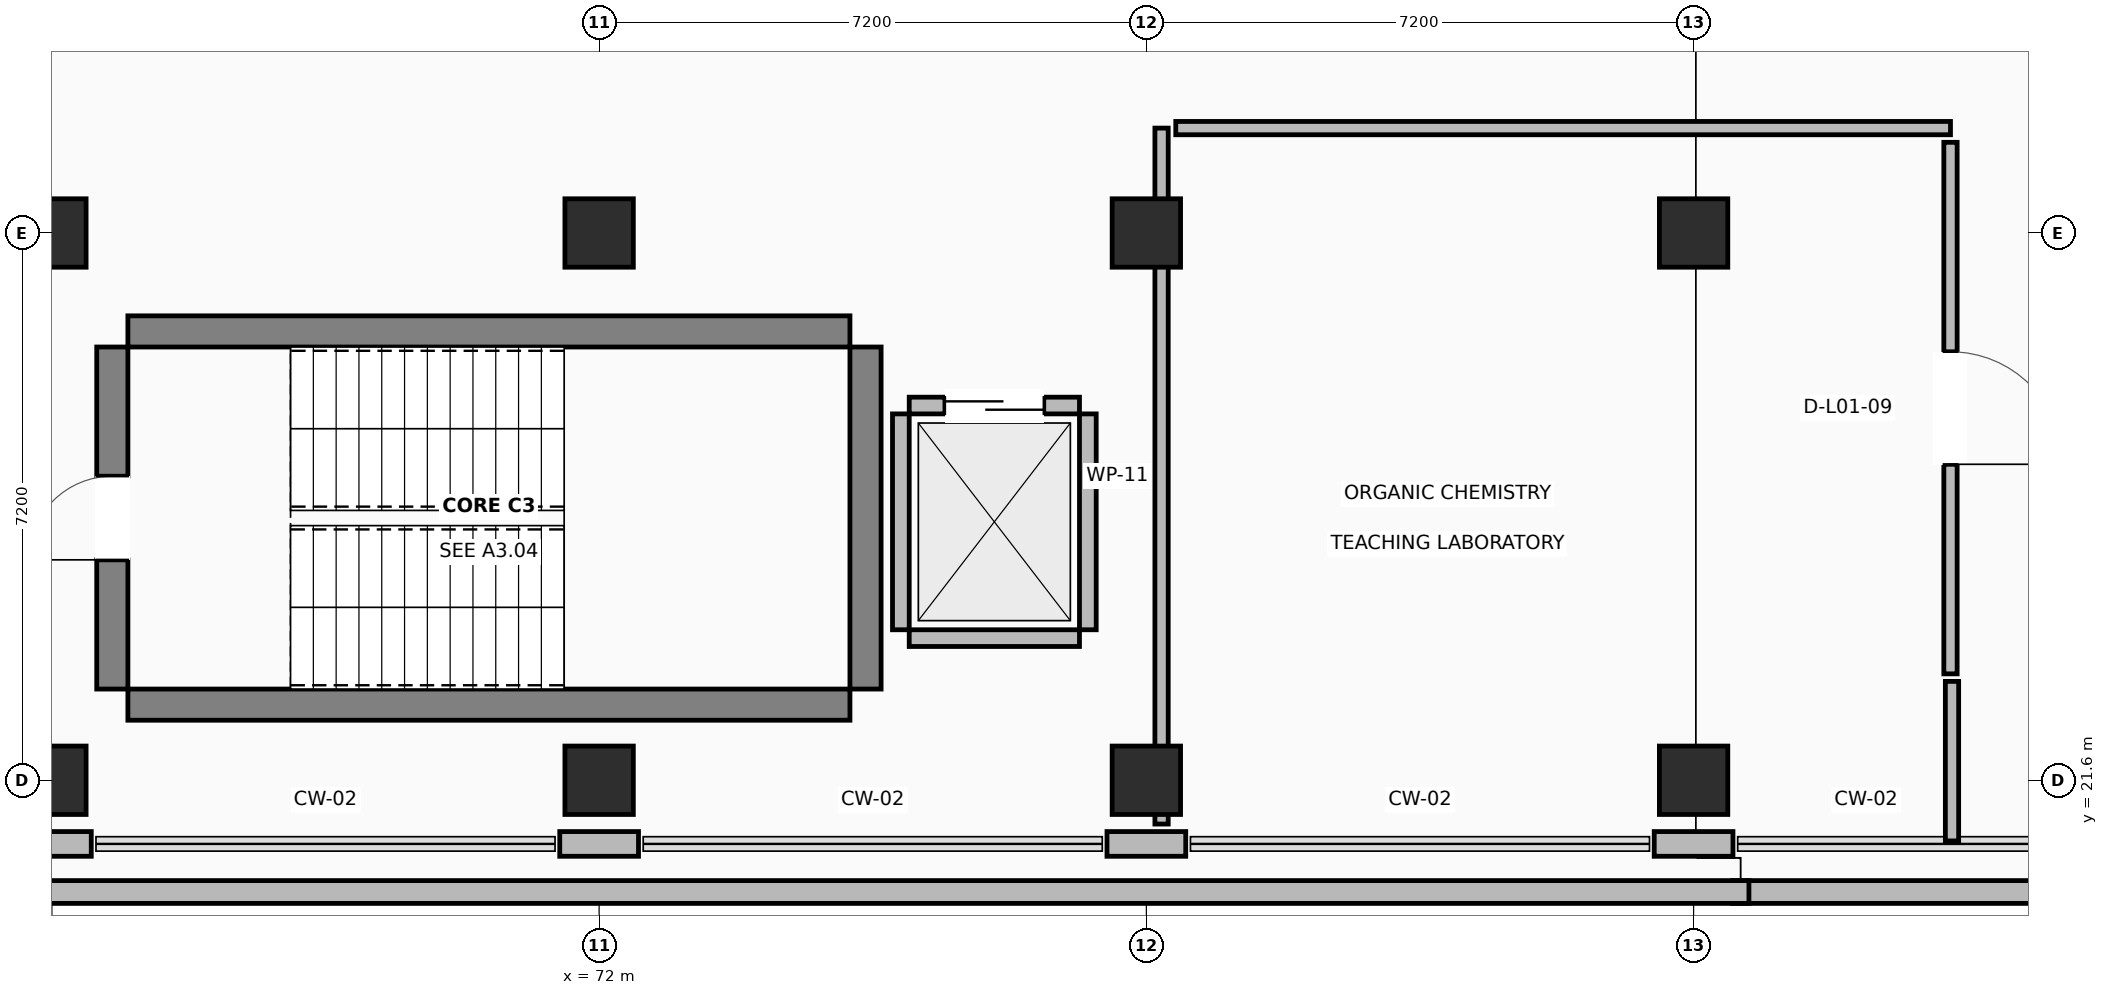
"""IFC4 building model, lengths in metres.
Left out: names, types, materials, properties, quantities, classifications, styles, units other than length and angle.
Written with IfcOpenShell. Run it as: python <this file> out.ifc"""

import sys

from ifc_helpers import new_model, si_unit, direction, frame, frame_2d, origin, origin_2d, place, context, subcontext, project, spatial, rectangle, extrude, element, fill, save


model = new_model("IFC4")
c1 = context("Model", 3, precision=1e-05, world=origin(), true_north=direction((0.0, 1.0)))
c2 = subcontext(c1, "Body", "Model", "MODEL_VIEW")
j1 = project(units=[si_unit("LENGTHUNIT", "METRE"), si_unit("PLANEANGLEUNIT", "RADIAN")], contexts=[c1])
p1 = place(None, origin())
s1 = spatial("IfcSite", under=j1, at=p1, CompositionType="ELEMENT")
p2 = place(p1, origin())
s2 = spatial("IfcBuilding", under=s1, at=p2, CompositionType="ELEMENT")
p3 = place(p2, frame((0.0, 0.0, 4.5)))
s3 = spatial("IfcBuildingStorey", under=s2, at=p3, CompositionType="ELEMENT", Elevation=4.5)
for number, where, z_axis, x_axis in (
    (1, (64.8, 21.6, 0.0), (0.0, 0.0, 1.0), (1.0, 0.0, 0.0)),
    (2, (64.8, 28.8, 0.0), (0.0, 0.0, 1.0), (1.0, 0.0, 0.0)),
    (3, (72.0, 21.6, 0.0), (0.0, 0.0, 1.0), (1.0, 0.0, 0.0)),
    (4, (72.0, 28.8, 0.0), (0.0, 0.0, 1.0), (1.0, 0.0, 0.0)),
    (5, (79.2, 21.6, 0.0), (0.0, 0.0, 1.0), (1.0, 0.0, 0.0)),
    (6, (79.2, 28.8, 0.0), (0.0, 0.0, 1.0), (1.0, 0.0, 0.0)),
    (7, (86.4, 21.6, 0.0), (0.0, 0.0, 1.0), (1.0, 0.0, 0.0)),
    (8, (86.4, 28.8, 0.0), (0.0, 0.0, 1.0), (1.0, 0.0, 0.0)),
):
    element("IfcColumn", number, at=place(p3, frame(where, z_axis=z_axis, x_axis=x_axis)), inside=s3, PredefinedType="COLUMN", context=c2, shape_type="SweptSolid", body=[
        extrude(rectangle(XDim=0.9, YDim=0.9, at=origin_2d()), origin(), (0.0, 0.0, 1.0), 4.22),
    ])
for number, where, z_axis, x_axis in (
    (9, (65.8, 22.595, 0.0), (0.0, 0.0, 1.0), (1.0, 0.0, 0.0)),
    (10, (65.8, 27.505, 0.0), (0.0, 0.0, 1.0), (1.0, 0.0, 0.0)),
):
    element("IfcWall", number, at=place(p3, frame(where, z_axis=z_axis, x_axis=x_axis)), inside=s3, PredefinedType="SHEAR", context=c2, shape_type="SweptSolid", body=[
        extrude(rectangle(XDim=9.5, YDim=0.41, at=frame_2d((4.75, 0.0))), origin(), (0.0, 0.0, 1.0), 4.22),
    ])
p4 = place(p3, frame((65.595, 22.8, 0.0), z_axis=(0.0, 0.0, 1.0), x_axis=(0.0, 1.0, 0.0)))
e11 = element("IfcWall", 11, at=p4, inside=s3, PredefinedType="SHEAR", context=c2, shape_type="SweptSolid", body=[
    extrude(rectangle(XDim=4.5, YDim=0.41, at=frame_2d((2.25, 0.0))), origin(), (0.0, 0.0, 1.0), 4.22),
])
p5 = place(p4, frame((1.7, 0.0, 0.0)))
e12 = element("IfcOpeningElement", 12, at=p5, cuts=e11, PredefinedType="OPENING", context=c2, shape_type="SweptSolid", body=[
    extrude(rectangle(XDim=1.1, YDim=2.15, at=frame_2d((0.55, 1.075))), frame((0.0, 0.215, 0.0), z_axis=(0.0, -1.0, 0.0), x_axis=(1.0, 0.0, 0.0)), (0.0, 0.0, 1.0), 0.43),
])
p6 = place(p3, frame((75.505, 22.8, 0.0), z_axis=(0.0, 0.0, 1.0), x_axis=(0.0, 1.0, 0.0)))
e13 = element("IfcWall", 13, at=p6, inside=s3, PredefinedType="SHEAR", context=c2, shape_type="SweptSolid", body=[
    extrude(rectangle(XDim=4.5, YDim=0.41, at=frame_2d((2.25, 0.0))), origin(), (0.0, 0.0, 1.0), 4.22),
])
for number, where, z_axis, x_axis in (
    (14, (64.282, 20.762, 0.0), (0.0, 0.0, 1.0), (1.0, 0.0, 0.0)),
    (15, (71.482, 20.762, 0.0), (0.0, 0.0, 1.0), (1.0, 0.0, 0.0)),
    (16, (78.682, 20.762, 0.0), (0.0, 0.0, 1.0), (1.0, 0.0, 0.0)),
):
    element("IfcWall", number, at=place(p3, frame(where, z_axis=z_axis, x_axis=x_axis)), inside=s3, PredefinedType="STANDARD", context=c2, shape_type="SweptSolid", body=[
        extrude(rectangle(XDim=1.036, YDim=0.325, at=frame_2d((0.518, 0.0))), origin(), (0.0, 0.0, 1.0), 3.26),
    ])
p7 = place(p3, frame((85.882, 20.762, 0.0), z_axis=(0.0, 0.0, 1.0), x_axis=(1.0, 0.0, 0.0)))
e17 = element("IfcWall", 17, at=p7, inside=s3, PredefinedType="STANDARD", context=c2, shape_type="SweptSolid", body=[
    extrude(rectangle(XDim=1.036, YDim=0.325, at=frame_2d((0.518, 0.0))), origin(), (0.0, 0.0, 1.0), 3.26),
])
p8 = place(p3, frame((115.82, 20.13, 0.0), z_axis=(0.0, 0.0, 1.0), x_axis=(-1.0, 0.0, 0.0)))
e18 = element("IfcWall", 18, at=p8, inside=s3, PredefinedType="PARAPET", context=c2, shape_type="SweptSolid", body=[
    extrude(rectangle(XDim=28.908, YDim=0.3, at=frame_2d((14.454, 0.0))), origin(), (0.0, 0.0, 1.0), 1.18),
])
p9 = place(p3, frame((87.128, 20.13, 0.0), z_axis=(0.0, 0.0, 1.0), x_axis=(-1.0, 0.0, 0.0)))
e19 = element("IfcWall", 19, at=p9, inside=s3, PredefinedType="PARAPET", context=c2, shape_type="SweptSolid", body=[
    extrude(rectangle(XDim=29.498, YDim=0.3, at=frame_2d((14.749, 0.0))), origin(), (0.0, 0.0, 1.0), 1.18),
])
p10 = place(p3, frame((76.08, 23.47, 0.0), z_axis=(0.0, 0.0, 1.0), x_axis=(1.0, 0.0, 0.0)))
e20 = element("IfcWall", 20, at=p10, inside=s3, PredefinedType="STANDARD", context=c2, shape_type="SweptSolid", body=[
    extrude(rectangle(XDim=2.24, YDim=0.22, at=frame_2d((1.12, 0.0))), origin(), (0.0, 0.0, 1.0), 3.26),
])
p11 = place(p3, frame((76.08, 26.53, 0.0), z_axis=(0.0, 0.0, 1.0), x_axis=(1.0, 0.0, 0.0)))
e21 = element("IfcWall", 21, at=p11, inside=s3, PredefinedType="STANDARD", context=c2, shape_type="SweptSolid", body=[
    extrude(rectangle(XDim=2.24, YDim=0.22, at=frame_2d((1.12, 0.0))), origin(), (0.0, 0.0, 1.0), 3.26),
])
p12 = place(p11, frame((0.47, 0.0, 0.0)))
e22 = element("IfcOpeningElement", 22, at=p12, cuts=e21, PredefinedType="OPENING", context=c2, shape_type="SweptSolid", body=[
    extrude(rectangle(XDim=1.3, YDim=2.2, at=frame_2d((0.65, 1.1))), frame((0.0, 0.12, 0.0), z_axis=(0.0, -1.0, 0.0), x_axis=(1.0, 0.0, 0.0)), (0.0, 0.0, 1.0), 0.24),
])
for number, where, z_axis, x_axis in (
    (23, (75.97, 23.58, 0.0), (0.0, 0.0, 1.0), (0.0, 1.0, 0.0)),
    (24, (78.43, 23.58, 0.0), (0.0, 0.0, 1.0), (0.0, 1.0, 0.0)),
):
    element("IfcWall", number, at=place(p3, frame(where, z_axis=z_axis, x_axis=x_axis)), inside=s3, PredefinedType="STANDARD", context=c2, shape_type="SweptSolid", body=[
        extrude(rectangle(XDim=2.84, YDim=0.22, at=frame_2d((1.42, 0.0))), origin(), (0.0, 0.0, 1.0), 3.26),
    ])
p13 = place(p3, frame((79.4, 21.024, 0.0), z_axis=(0.0, 0.0, 1.0), x_axis=(0.0, 1.0, 0.0)))
e25 = element("IfcWall", 25, at=p13, inside=s3, PredefinedType="PARTITIONING", context=c2, shape_type="SweptSolid", body=[
    extrude(rectangle(XDim=9.156, YDim=0.175, at=frame_2d((4.578, 0.0))), origin(), (0.0, 0.0, 1.0), 3.26),
])
p14 = place(p3, frame((79.587, 30.18, 0.0), z_axis=(0.0, 0.0, 1.0), x_axis=(1.0, 0.0, 0.0)))
e26 = element("IfcWall", 26, at=p14, inside=s3, PredefinedType="PARTITIONING", context=c2, shape_type="SweptSolid", body=[
    extrude(rectangle(XDim=10.193, YDim=0.175, at=frame_2d((5.097, 0.0))), origin(), (0.0, 0.0, 1.0), 3.26),
])
p15 = place(p3, frame((89.78, 29.993, 0.0), z_axis=(0.0, 0.0, 1.0), x_axis=(0.0, -1.0, 0.0)))
e27 = element("IfcWall", 27, at=p15, inside=s3, PredefinedType="PARTITIONING", context=c2, shape_type="SweptSolid", body=[
    extrude(rectangle(XDim=6.993, YDim=0.175, at=frame_2d((3.497, 0.0))), origin(), (0.0, 0.0, 1.0), 3.26),
])
p16 = place(p15, frame((2.756, 0.0, 0.0)))
e28 = element("IfcOpeningElement", 28, at=p16, cuts=e27, PredefinedType="OPENING", context=c2, shape_type="SweptSolid", body=[
    extrude(rectangle(XDim=1.48, YDim=2.2, at=frame_2d((0.74, 1.1))), frame((0.0, 0.097, 0.0), z_axis=(0.0, -1.0, 0.0), x_axis=(1.0, 0.0, 0.0)), (0.0, 0.0, 1.0), 0.195),
])
p17 = place(p3, frame((89.8, 22.901, 0.0), z_axis=(0.0, 0.0, 1.0), x_axis=(0.0, -1.0, 0.0)))
e29 = element("IfcWall", 29, at=p17, inside=s3, PredefinedType="PARTITIONING", context=c2, shape_type="SweptSolid", body=[
    extrude(rectangle(XDim=2.099, YDim=0.175, at=frame_2d((1.049, 0.0))), origin(), (0.0, 0.0, 1.0), 3.26),
])
p18 = place(p5, origin())
e30 = element("IfcDoor", 30, at=p18, inside=s3, OperationType="SINGLE_SWING_LEFT", PredefinedType="DOOR", context=c2, shape_type="SweptSolid", body=[
    extrude(rectangle(XDim=1.1, YDim=2.15, at=frame_2d((0.55, 1.075))), frame((0.0, 0.025, 0.0), z_axis=(0.0, -1.0, 0.0), x_axis=(1.0, 0.0, 0.0)), (0.0, 0.0, 1.0), 0.05),
])
fill(e12, e30)
p19 = place(p12, origin())
e31 = element("IfcDoor", 31, at=p19, inside=s3, OperationType="SLIDING_TO_LEFT", PredefinedType="DOOR", context=c2, shape_type="SweptSolid", body=[
    extrude(rectangle(XDim=1.3, YDim=2.2, at=frame_2d((0.65, 1.1))), frame((0.0, 0.025, 0.0), z_axis=(0.0, -1.0, 0.0), x_axis=(1.0, 0.0, 0.0)), (0.0, 0.0, 1.0), 0.05),
])
fill(e22, e31)
p20 = place(p16, origin())
e32 = element("IfcDoor", 32, at=p20, inside=s3, OperationType="SINGLE_SWING_RIGHT", PredefinedType="DOOR", context=c2, shape_type="SweptSolid", body=[
    extrude(rectangle(XDim=1.48, YDim=2.2, at=frame_2d((0.74, 1.1))), frame((0.0, 0.025, 0.0), z_axis=(0.0, -1.0, 0.0), x_axis=(1.0, 0.0, 0.0)), (0.0, 0.0, 1.0), 0.05),
])
fill(e28, e32)
save(model, sys.argv[1])
